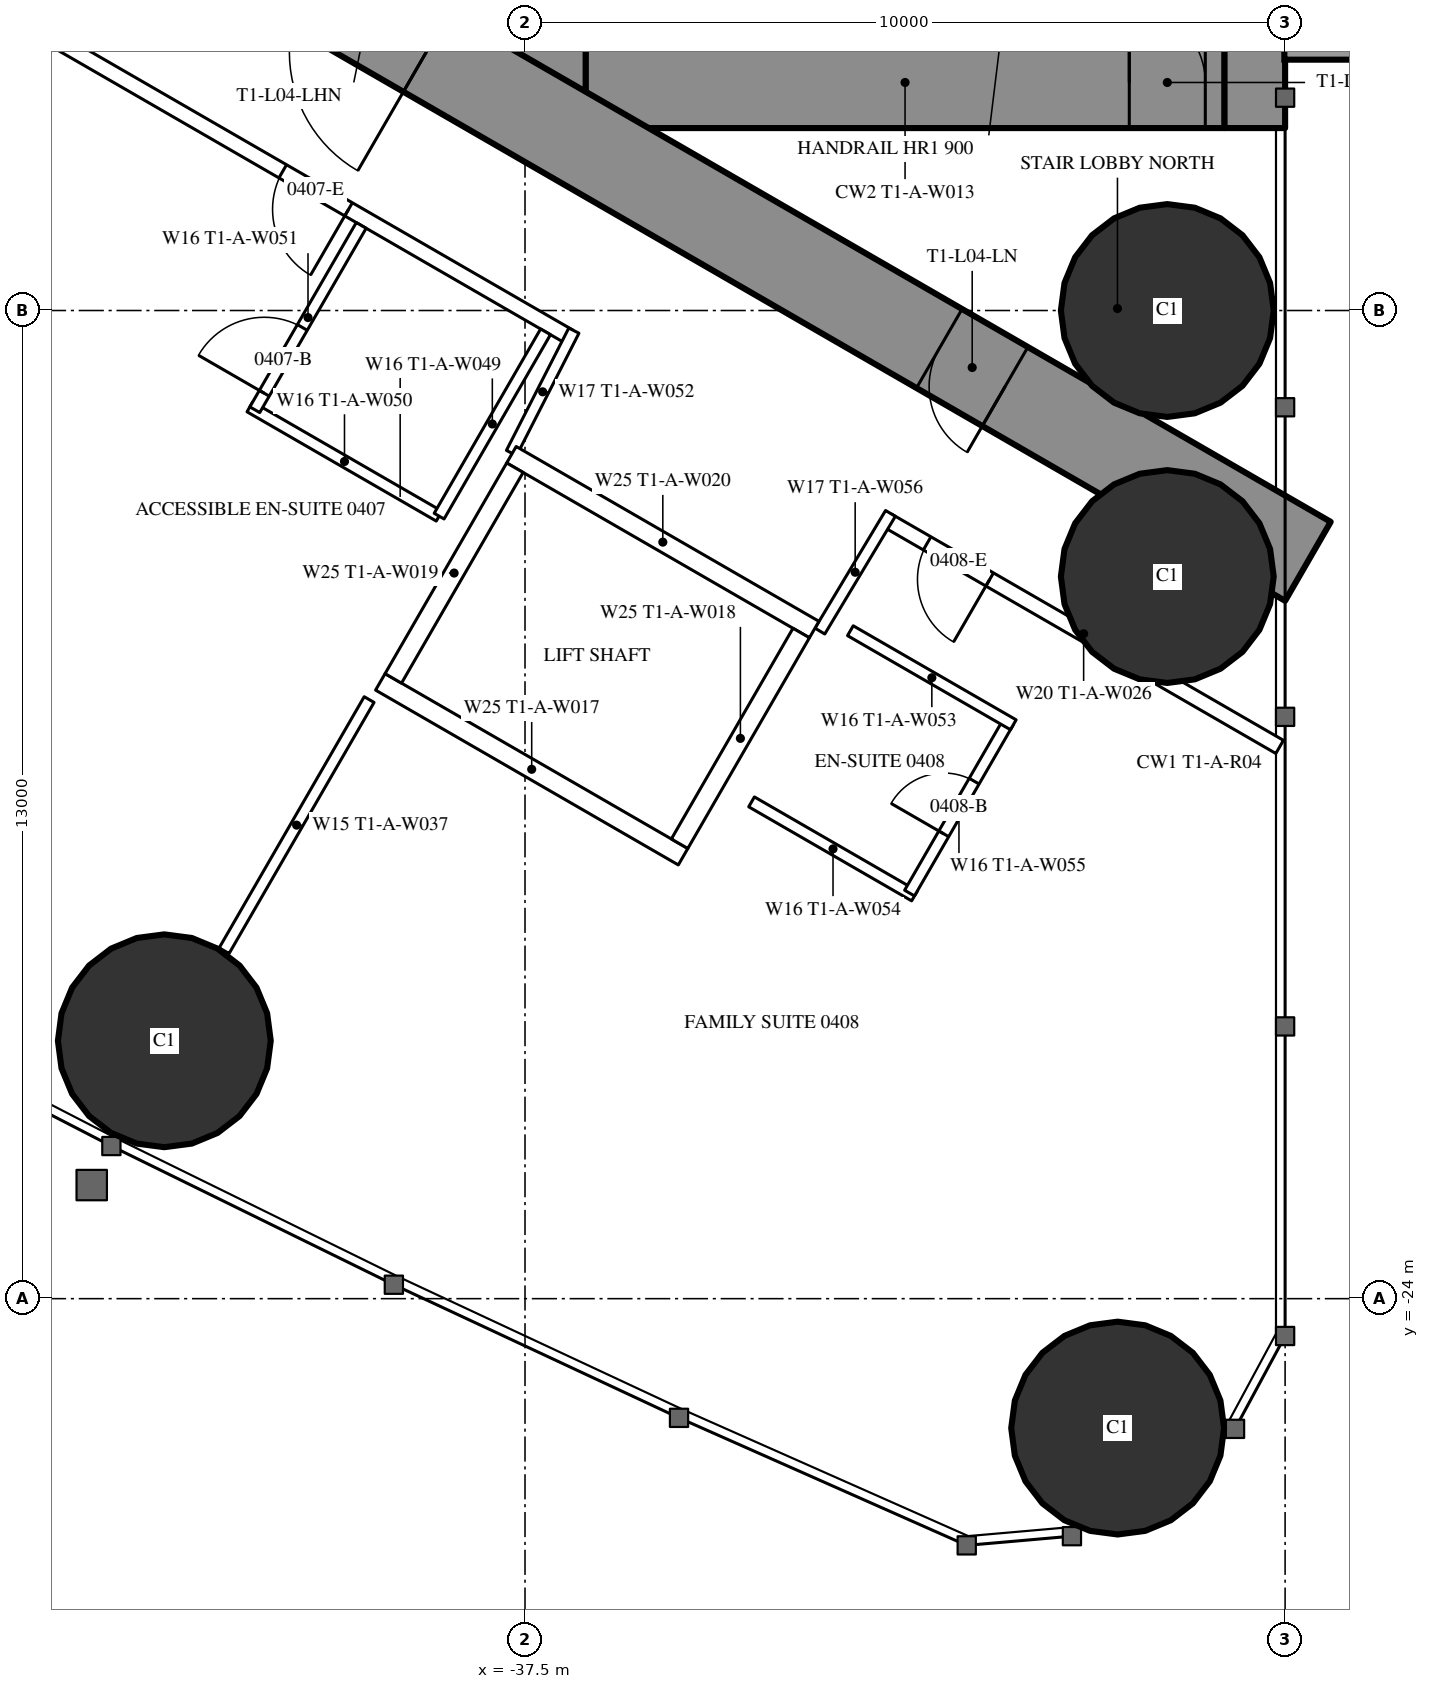
"""IFC4 building model, lengths in metres.
Left out: names, types, materials, properties, quantities, classifications, styles, units other than length and angle.
Written with IfcOpenShell. Run it as: python <this file> out.ifc"""

import sys

from ifc_helpers import new_model, si_unit, direction, frame, frame_2d, origin, origin_2d, place, context, subcontext, project, spatial, rectangle, hollow_circle, extrude, element, fill, save


model = new_model("IFC4")
c1 = context("Model", 3, precision=1e-05, world=origin(), true_north=direction((0.0, 1.0)))
c2 = subcontext(c1, "Body", "Model", "MODEL_VIEW")
j1 = project(units=[si_unit("LENGTHUNIT", "METRE"), si_unit("PLANEANGLEUNIT", "RADIAN")], contexts=[c1])
p1 = place(None, origin())
s1 = spatial("IfcSite", under=j1, at=p1, CompositionType="ELEMENT")
p2 = place(p1, origin())
s2 = spatial("IfcBuilding", under=s1, at=p2, CompositionType="ELEMENT")
p3 = place(p2, frame((0.0, 0.0, 21.5)))
s3 = spatial("IfcBuildingStorey", under=s2, at=p3, CompositionType="ELEMENT", Elevation=21.5)
for number, where, z_axis, x_axis in (
    (1, (-29.703, -25.703, 0.0), (0.0, 0.0, 1.0), (1.0, 0.0, 0.0)),
    (2, (-29.05, -11.0, 0.0), (0.0, 0.0, 1.0), (1.0, 0.0, 0.0)),
    (3, (-29.05, -14.5, 0.0), (0.0, 0.0, 1.0), (1.0, 0.0, 0.0)),
    (4, (-42.245, -20.607, 0.0), (0.0, 0.0, 1.0), (1.0, 0.0, 0.0)),
):
    element("IfcColumn", number, at=place(p3, frame(where, z_axis=z_axis, x_axis=x_axis)), inside=s3, PredefinedType="COLUMN", context=c2, shape_type="SweptSolid", body=[
        extrude(hollow_circle(Radius=1.4, WallThickness=0.12, at=origin_2d()), origin(), (0.0, 0.0, 1.0), 3.5),
    ])
p4 = place(p3, frame((-27.9, 8.6, 0.0), z_axis=(0.0, 0.0, 1.0), x_axis=(0.0, -1.0, 0.0)))
e5 = element("IfcWall", 5, at=p4, inside=s3, PredefinedType="SHEAR", context=c2, shape_type="SweptSolid", body=[
    extrude(rectangle(XDim=17.2, YDim=0.8, at=frame_2d((8.6, 0.0))), origin(), (0.0, 0.0, 1.0), 3.5),
])
p5 = place(p4, frame((2.45, 0.0, 0.6)))
e6 = element("IfcOpeningElement", 6, at=p5, cuts=e5, PredefinedType="OPENING", context=c2, shape_type="SweptSolid", body=[
    extrude(rectangle(XDim=0.6, YDim=2.1, at=frame_2d((0.3, 1.05))), frame((0.0, 0.41, 0.0), z_axis=(0.0, -1.0, 0.0), x_axis=(1.0, 0.0, 0.0)), (0.0, 0.0, 1.0), 0.82),
])
p6 = place(p4, frame((14.15, 0.0, 0.6)))
e7 = element("IfcOpeningElement", 7, at=p6, cuts=e5, PredefinedType="OPENING", context=c2, shape_type="SweptSolid", body=[
    extrude(rectangle(XDim=0.6, YDim=2.1, at=frame_2d((0.3, 1.05))), frame((0.0, 0.41, 0.0), z_axis=(0.0, -1.0, 0.0), x_axis=(1.0, 0.0, 0.0)), (0.0, 0.0, 1.0), 0.82),
])
p7 = place(p3, frame((-37.3, 8.6, 0.0), z_axis=(0.0, 0.0, 1.0), x_axis=(0.0, -1.0, 0.0)))
e8 = element("IfcWall", 8, at=p7, inside=s3, PredefinedType="SHEAR", context=c2, shape_type="SweptSolid", body=[
    extrude(rectangle(XDim=17.2, YDim=1.2, at=frame_2d((8.6, 0.0))), origin(), (0.0, 0.0, 1.0), 3.5),
])
p8 = place(p7, frame((7.7, 0.0, 0.0)))
e9 = element("IfcOpeningElement", 9, at=p8, cuts=e8, PredefinedType="OPENING", context=c2, shape_type="SweptSolid", body=[
    extrude(rectangle(XDim=1.8, YDim=2.2, at=frame_2d((0.9, 1.1))), frame((0.0, 0.61, 0.0), z_axis=(0.0, -1.0, 0.0), x_axis=(1.0, 0.0, 0.0)), (0.0, 0.0, 1.0), 1.22),
])
p9 = place(p3, frame((-28.3, -8.0, 0.0), z_axis=(0.0, 0.0, 1.0), x_axis=(-1.0, 0.0, 0.0)))
e10 = element("IfcWall", 10, at=p9, inside=s3, PredefinedType="SHEAR", context=c2, shape_type="SweptSolid", body=[
    extrude(rectangle(XDim=8.4, YDim=1.2, at=frame_2d((4.2, 0.0))), origin(), (0.0, 0.0, 1.0), 3.5),
])
p10 = place(p9, frame((0.25, 0.0, 0.0)))
e11 = element("IfcOpeningElement", 11, at=p10, cuts=e10, PredefinedType="OPENING", context=c2, shape_type="SweptSolid", body=[
    extrude(rectangle(XDim=1.0, YDim=2.2, at=frame_2d((0.5, 1.1))), frame((0.0, 0.61, 0.0), z_axis=(0.0, -1.0, 0.0), x_axis=(1.0, 0.0, 0.0)), (0.0, 0.0, 1.0), 1.22),
])
p11 = place(p3, frame((-27.2, -14.3, 0.0), z_axis=(0.0, 0.0, 1.0), x_axis=(-0.866024021859, 0.500002393557, 0.0)))
e12 = element("IfcWall", 12, at=p11, inside=s3, PredefinedType="SHEAR", context=c2, shape_type="SweptSolid", body=[
    extrude(rectangle(XDim=27.907, YDim=1.2, at=frame_2d((13.954, 0.0))), origin(), (0.0, 0.0, 1.0), 3.5),
])
p12 = place(p11, frame((4.6, 0.0, 0.0)))
e13 = element("IfcOpeningElement", 13, at=p12, cuts=e12, PredefinedType="OPENING", context=c2, shape_type="SweptSolid", body=[
    extrude(rectangle(XDim=1.0, YDim=2.2, at=frame_2d((0.5, 1.1))), frame((0.0, 0.61, 0.0), z_axis=(0.0, -1.0, 0.0), x_axis=(1.0, 0.0, 0.0)), (0.0, 0.0, 1.0), 1.22),
])
p13 = place(p11, frame((13.395, 0.0, 0.0)))
e14 = element("IfcOpeningElement", 14, at=p13, cuts=e12, PredefinedType="OPENING", context=c2, shape_type="SweptSolid", body=[
    extrude(rectangle(XDim=1.8, YDim=2.2, at=frame_2d((0.9, 1.1))), frame((0.0, 0.61, 0.0), z_axis=(0.0, -1.0, 0.0), x_axis=(1.0, 0.0, 0.0)), (0.0, 0.0, 1.0), 1.22),
])
p14 = place(p3, frame((-39.551, -16.118, 0.0), z_axis=(0.0, 0.0, 1.0), x_axis=(-0.499986503906, -0.866033195618, 0.0)))
e15 = element("IfcWall", 15, at=p14, inside=s3, PredefinedType="PARTITIONING", context=c2, shape_type="SweptSolid", body=[
    extrude(rectangle(XDim=3.815, YDim=0.15, at=frame_2d((1.907, 0.0))), origin(), (0.0, 0.0, 1.0), 3.25),
])
p15 = place(p3, frame((-27.572, -16.741, 0.0), z_axis=(0.0, 0.0, 1.0), x_axis=(-0.866024464444, 0.500001626982, 0.0)))
e16 = element("IfcWall", 16, at=p15, inside=s3, PredefinedType="PARTITIONING", context=c2, shape_type="SweptSolid", body=[
    extrude(rectangle(XDim=5.955, YDim=0.2, at=frame_2d((2.978, 0.0))), origin(), (0.0, 0.0, 1.0), 3.25),
])
p16 = place(p15, frame((4.405, 0.0, 0.0)))
e17 = element("IfcOpeningElement", 17, at=p16, cuts=e16, PredefinedType="OPENING", context=c2, shape_type="SweptSolid", body=[
    extrude(rectangle(XDim=0.95, YDim=2.2, at=frame_2d((0.475, 1.1))), frame((0.0, 0.11, 0.0), z_axis=(0.0, -1.0, 0.0), x_axis=(1.0, 0.0, 0.0)), (0.0, 0.0, 1.0), 0.22),
])
p17 = place(p3, frame((-36.92, -11.344, 0.0), z_axis=(0.0, 0.0, 1.0), x_axis=(-0.866028313256, 0.499994960614, 0.0)))
e18 = element("IfcWall", 18, at=p17, inside=s3, PredefinedType="PARTITIONING", context=c2, shape_type="SweptSolid", body=[
    extrude(rectangle(XDim=22.568, YDim=0.2, at=frame_2d((11.284, 0.0))), origin(), (0.0, 0.0, 1.0), 3.25),
])
p18 = place(p17, frame((15.03, 0.0, 0.0)))
e19 = element("IfcOpeningElement", 19, at=p18, cuts=e18, PredefinedType="OPENING", context=c2, shape_type="SweptSolid", body=[
    extrude(rectangle(XDim=0.95, YDim=2.2, at=frame_2d((0.475, 1.1))), frame((0.0, 0.11, 0.0), z_axis=(0.0, -1.0, 0.0), x_axis=(1.0, 0.0, 0.0)), (0.0, 0.0, 1.0), 0.22),
])
p19 = place(p17, frame((3.35, 0.0, 0.0)))
e20 = element("IfcOpeningElement", 20, at=p19, cuts=e18, PredefinedType="OPENING", context=c2, shape_type="SweptSolid", body=[
    extrude(rectangle(XDim=1.0, YDim=2.2, at=frame_2d((0.5, 1.1))), frame((0.0, 0.11, 0.0), z_axis=(0.0, -1.0, 0.0), x_axis=(1.0, 0.0, 0.0)), (0.0, 0.0, 1.0), 0.22),
])
p20 = place(p3, frame((-36.857, -11.265, 0.0), z_axis=(0.0, 0.0, 1.0), x_axis=(-0.454225294761, -0.890886851176, 0.0)))
e21 = element("IfcWall", 21, at=p20, inside=s3, PredefinedType="PARTITIONING", context=c2, shape_type="SweptSolid", body=[
    extrude(rectangle(XDim=1.807, YDim=0.15, at=frame_2d((0.904, 0.0))), origin(), (0.0, 0.0, 1.0), 3.25),
])
p21 = place(p3, frame((-33.621, -15.218, 0.0), z_axis=(0.0, 0.0, 1.0), x_axis=(0.514336634837, 0.857588377991, 0.0)))
e22 = element("IfcWall", 22, at=p21, inside=s3, PredefinedType="PARTITIONING", context=c2, shape_type="SweptSolid", body=[
    extrude(rectangle(XDim=1.805, YDim=0.15, at=frame_2d((0.903, 0.0))), origin(), (0.0, 0.0, 1.0), 3.25),
])
p22 = place(p3, frame((-38.63, -13.705, 0.0), z_axis=(0.0, 0.0, 1.0), x_axis=(-0.866018712932, 0.500011588718, 0.0)))
e23 = element("IfcWall", 23, at=p22, inside=s3, PredefinedType="PARTITIONING", context=c2, shape_type="SweptSolid", body=[
    extrude(rectangle(XDim=2.875, YDim=0.15, at=frame_2d((1.438, 0.0))), origin(), (0.0, 0.0, 1.0), 3.25),
])
p23 = place(p3, frame((-39.655, -9.88, 0.0), z_axis=(0.0, 0.0, 1.0), x_axis=(-0.500049511043, -0.865996816683, 0.0)))
e24 = element("IfcWall", 24, at=p23, inside=s3, PredefinedType="PARTITIONING", context=c2, shape_type="SweptSolid", body=[
    extrude(rectangle(XDim=2.8, YDim=0.15, at=frame_2d((1.4, 0.0))), origin(), (0.0, 0.0, 1.0), 3.25),
])
p24 = place(p23, frame((1.55, 0.0, 0.0)))
e25 = element("IfcOpeningElement", 25, at=p24, cuts=e24, PredefinedType="OPENING", context=c2, shape_type="SweptSolid", body=[
    extrude(rectangle(XDim=1.0, YDim=2.2, at=frame_2d((0.5, 1.1))), frame((0.0, 0.085, 0.0), z_axis=(0.0, -1.0, 0.0), x_axis=(1.0, 0.0, 0.0)), (0.0, 0.0, 1.0), 0.17),
])
p25 = place(p3, frame((-37.23, -11.281, 0.0), z_axis=(0.0, 0.0, 1.0), x_axis=(-0.500049511043, -0.865996816683, 0.0)))
e26 = element("IfcWall", 26, at=p25, inside=s3, PredefinedType="PARTITIONING", context=c2, shape_type="SweptSolid", body=[
    extrude(rectangle(XDim=2.8, YDim=0.15, at=frame_2d((1.4, 0.0))), origin(), (0.0, 0.0, 1.0), 3.25),
])
p26 = place(p3, frame((-32.376, -18.702, 0.0), z_axis=(0.0, 0.0, 1.0), x_axis=(-0.866006523861, 0.500032699561, 0.0)))
e27 = element("IfcWall", 27, at=p26, inside=s3, PredefinedType="PARTITIONING", context=c2, shape_type="SweptSolid", body=[
    extrude(rectangle(XDim=2.475, YDim=0.15, at=frame_2d((1.237, 0.0))), origin(), (0.0, 0.0, 1.0), 3.25),
])
p27 = place(p3, frame((-31.141, -16.413, 0.0), z_axis=(0.0, 0.0, 1.0), x_axis=(-0.500006934395, -0.866021400173, 0.0)))
e28 = element("IfcWall", 28, at=p27, inside=s3, PredefinedType="PARTITIONING", context=c2, shape_type="SweptSolid", body=[
    extrude(rectangle(XDim=2.6, YDim=0.15, at=frame_2d((1.3, 0.0))), origin(), (0.0, 0.0, 1.0), 3.25),
])
p28 = place(p27, frame((0.9, 0.0, 0.0)))
e29 = element("IfcOpeningElement", 29, at=p28, cuts=e28, PredefinedType="OPENING", context=c2, shape_type="SweptSolid", body=[
    extrude(rectangle(XDim=0.8, YDim=2.2, at=frame_2d((0.4, 1.1))), frame((0.0, 0.085, 0.0), z_axis=(0.0, -1.0, 0.0), x_axis=(1.0, 0.0, 0.0)), (0.0, 0.0, 1.0), 0.17),
])
p29 = place(p3, frame((-31.076, -16.45, 0.0), z_axis=(0.0, 0.0, 1.0), x_axis=(-0.866073894602, 0.499916002032, 0.0)))
e30 = element("IfcWall", 30, at=p29, inside=s3, PredefinedType="PARTITIONING", context=c2, shape_type="SweptSolid", body=[
    extrude(rectangle(XDim=2.475, YDim=0.15, at=frame_2d((1.238, 0.0))), origin(), (0.0, 0.0, 1.0), 3.25),
])
p30 = place(p3, frame((-33.696, -15.197, 0.0), z_axis=(0.0, 0.0, 1.0), x_axis=(-0.865976953817, 0.500083908417, 0.0)))
e31 = element("IfcWall", 31, at=p30, inside=s3, PredefinedType="PARTITIONING", context=c2, shape_type="SweptSolid", body=[
    extrude(rectangle(XDim=4.599, YDim=0.25, at=frame_2d((2.3, 0.0))), origin(), (0.0, 0.0, 1.0), 3.25),
])
p31 = place(p3, frame((-35.42, -18.186, 0.0), z_axis=(0.0, 0.0, 1.0), x_axis=(-0.865990227814, 0.50006092162, 0.0)))
e32 = element("IfcWall", 32, at=p31, inside=s3, PredefinedType="PARTITIONING", context=c2, shape_type="SweptSolid", body=[
    extrude(rectangle(XDim=4.6, YDim=0.25, at=frame_2d((2.3, 0.0))), origin(), (0.0, 0.0, 1.0), 3.25),
])
p32 = place(p3, frame((-33.866, -15.243, 0.0), z_axis=(0.0, 0.0, 1.0), x_axis=(-0.499929347863, -0.866066190972, 0.0)))
e33 = element("IfcWall", 33, at=p32, inside=s3, PredefinedType="PARTITIONING", context=c2, shape_type="SweptSolid", body=[
    extrude(rectangle(XDim=3.201, YDim=0.25, at=frame_2d((1.6, 0.0))), origin(), (0.0, 0.0, 1.0), 3.25),
])
p33 = place(p3, frame((-37.633, -13.068, 0.0), z_axis=(0.0, 0.0, 1.0), x_axis=(-0.499872130319, -0.866099216793, 0.0)))
e34 = element("IfcWall", 34, at=p33, inside=s3, PredefinedType="PARTITIONING", context=c2, shape_type="SweptSolid", body=[
    extrude(rectangle(XDim=3.2, YDim=0.25, at=frame_2d((1.6, 0.0))), origin(), (0.0, 0.0, 1.0), 3.25),
])
p34 = place(p24, origin())
e35 = element("IfcDoor", 35, at=p34, inside=s3, OperationType="SINGLE_SWING_RIGHT", PredefinedType="DOOR", context=c2, shape_type="SweptSolid", body=[
    extrude(rectangle(XDim=1.0, YDim=2.2, at=frame_2d((0.5, 1.1))), frame((0.0, 0.025, 0.0), z_axis=(0.0, -1.0, 0.0), x_axis=(1.0, 0.0, 0.0)), (0.0, 0.0, 1.0), 0.05),
])
fill(e25, e35)
p35 = place(p19, origin())
e36 = element("IfcDoor", 36, at=p35, inside=s3, OperationType="SINGLE_SWING_LEFT", PredefinedType="DOOR", context=c2, shape_type="SweptSolid", body=[
    extrude(rectangle(XDim=1.0, YDim=2.2, at=frame_2d((0.5, 1.1))), frame((0.0, 0.025, 0.0), z_axis=(0.0, -1.0, 0.0), x_axis=(1.0, 0.0, 0.0)), (0.0, 0.0, 1.0), 0.05),
])
fill(e20, e36)
p36 = place(p28, origin())
e37 = element("IfcDoor", 37, at=p36, inside=s3, OperationType="SINGLE_SWING_RIGHT", PredefinedType="DOOR", context=c2, shape_type="SweptSolid", body=[
    extrude(rectangle(XDim=0.8, YDim=2.2, at=frame_2d((0.4, 1.1))), frame((0.0, 0.025, 0.0), z_axis=(0.0, -1.0, 0.0), x_axis=(1.0, 0.0, 0.0)), (0.0, 0.0, 1.0), 0.05),
])
fill(e29, e37)
p37 = place(p16, origin())
e38 = element("IfcDoor", 38, at=p37, inside=s3, OperationType="SINGLE_SWING_LEFT", PredefinedType="DOOR", context=c2, shape_type="SweptSolid", body=[
    extrude(rectangle(XDim=0.95, YDim=2.2, at=frame_2d((0.475, 1.1))), frame((0.0, 0.025, 0.0), z_axis=(0.0, -1.0, 0.0), x_axis=(1.0, 0.0, 0.0)), (0.0, 0.0, 1.0), 0.05),
])
fill(e17, e38)
p38 = place(p12, origin())
e39 = element("IfcDoor", 39, at=p38, inside=s3, OperationType="SINGLE_SWING_LEFT", PredefinedType="DOOR", context=c2, shape_type="SweptSolid", body=[
    extrude(rectangle(XDim=1.0, YDim=2.2, at=frame_2d((0.5, 1.1))), frame((0.0, 0.025, 0.0), z_axis=(0.0, -1.0, 0.0), x_axis=(1.0, 0.0, 0.0)), (0.0, 0.0, 1.0), 0.05),
])
fill(e13, e39)
p39 = place(p13, origin())
e40 = element("IfcDoor", 40, at=p39, inside=s3, OperationType="DOUBLE_DOOR_SINGLE_SWING", PredefinedType="DOOR", context=c2, shape_type="SweptSolid", body=[
    extrude(rectangle(XDim=1.8, YDim=2.2, at=frame_2d((0.9, 1.1))), frame((0.0, 0.025, 0.0), z_axis=(0.0, -1.0, 0.0), x_axis=(1.0, 0.0, 0.0)), (0.0, 0.0, 1.0), 0.05),
])
fill(e14, e40)
p40 = place(p10, origin())
e41 = element("IfcDoor", 41, at=p40, inside=s3, OperationType="SINGLE_SWING_RIGHT", PredefinedType="DOOR", context=c2, shape_type="SweptSolid", body=[
    extrude(rectangle(XDim=1.0, YDim=2.2, at=frame_2d((0.5, 1.1))), frame((0.0, 0.025, 0.0), z_axis=(0.0, -1.0, 0.0), x_axis=(1.0, 0.0, 0.0)), (0.0, 0.0, 1.0), 0.05),
])
fill(e11, e41)
save(model, sys.argv[1])
